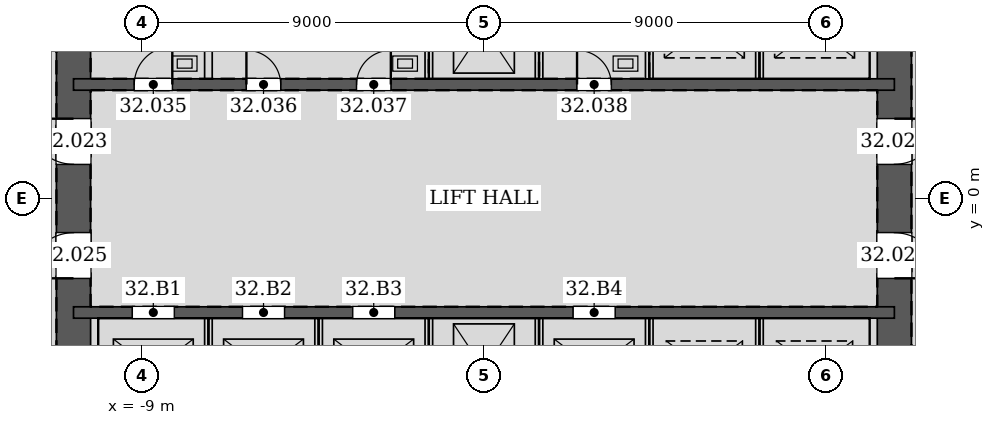
"""IFC4 building model, lengths in metres.
Left out: names, types, materials, properties, quantities, classifications, styles, units other than length and angle.
Written with IfcOpenShell. Run it as: python <this file> out.ifc"""

import sys

from ifc_helpers import new_model, si_unit, direction, frame, frame_2d, origin, place, context, subcontext, project, spatial, rectangle, extrude, element, fill, save


model = new_model("IFC4")
c1 = context("Model", 3, precision=1e-05, world=origin(), true_north=direction((0.0, 1.0)))
c2 = subcontext(c1, "Body", "Model", "MODEL_VIEW")
j1 = project(units=[si_unit("LENGTHUNIT", "METRE"), si_unit("PLANEANGLEUNIT", "RADIAN")], contexts=[c1])
p1 = place(None, origin())
s1 = spatial("IfcSite", under=j1, at=p1, CompositionType="ELEMENT")
p2 = place(p1, origin())
s2 = spatial("IfcBuilding", under=s1, at=p2, CompositionType="ELEMENT")
p3 = place(p2, frame((0.0, 0.0, 142.8)))
s3 = spatial("IfcBuildingStorey", under=s2, at=p3, CompositionType="ELEMENT", Elevation=142.8)
p4 = place(p3, frame((10.8, -10.8, 0.0), z_axis=(0.0, 0.0, 1.0), x_axis=(0.0, 1.0, 0.0)))
e1 = element("IfcWall", 1, at=p4, inside=s3, PredefinedType="SOLIDWALL", context=c2, shape_type="SweptSolid", body=[
    extrude(rectangle(XDim=21.6, YDim=0.9, at=frame_2d((10.8, 0.0))), origin(), (0.0, 0.0, 1.0), 4.2),
])
p5 = place(p4, frame((11.7, 0.0, 0.0)))
e2 = element("IfcOpeningElement", 2, at=p5, cuts=e1, PredefinedType="OPENING", context=c2, shape_type="SweptSolid", body=[
    extrude(rectangle(XDim=1.2, YDim=2.1, at=frame_2d((0.6, 1.05))), frame((0.0, 0.46, 0.0), z_axis=(0.0, -1.0, 0.0), x_axis=(1.0, 0.0, 0.0)), (0.0, 0.0, 1.0), 0.92),
])
p6 = place(p4, frame((8.7, 0.0, 0.0)))
e3 = element("IfcOpeningElement", 3, at=p6, cuts=e1, PredefinedType="OPENING", context=c2, shape_type="SweptSolid", body=[
    extrude(rectangle(XDim=1.2, YDim=2.1, at=frame_2d((0.6, 1.05))), frame((0.0, 0.46, 0.0), z_axis=(0.0, -1.0, 0.0), x_axis=(1.0, 0.0, 0.0)), (0.0, 0.0, 1.0), 0.92),
])
p7 = place(p3, frame((-10.8, 10.8, 0.0), z_axis=(0.0, 0.0, 1.0), x_axis=(0.0, -1.0, 0.0)))
e4 = element("IfcWall", 4, at=p7, inside=s3, PredefinedType="SOLIDWALL", context=c2, shape_type="SweptSolid", body=[
    extrude(rectangle(XDim=21.6, YDim=0.9, at=frame_2d((10.8, 0.0))), origin(), (0.0, 0.0, 1.0), 4.2),
])
p8 = place(p7, frame((8.7, 0.0, 0.0)))
e5 = element("IfcOpeningElement", 5, at=p8, cuts=e4, PredefinedType="OPENING", context=c2, shape_type="SweptSolid", body=[
    extrude(rectangle(XDim=1.2, YDim=2.1, at=frame_2d((0.6, 1.05))), frame((0.0, 0.46, 0.0), z_axis=(0.0, -1.0, 0.0), x_axis=(1.0, 0.0, 0.0)), (0.0, 0.0, 1.0), 0.92),
])
p9 = place(p7, frame((11.7, 0.0, 0.0)))
e6 = element("IfcOpeningElement", 6, at=p9, cuts=e4, PredefinedType="OPENING", context=c2, shape_type="SweptSolid", body=[
    extrude(rectangle(XDim=1.2, YDim=2.1, at=frame_2d((0.6, 1.05))), frame((0.0, 0.46, 0.0), z_axis=(0.0, -1.0, 0.0), x_axis=(1.0, 0.0, 0.0)), (0.0, 0.0, 1.0), 0.92),
])
p10 = place(p3, frame((-10.8, 3.0, 0.0), z_axis=(0.0, 0.0, 1.0), x_axis=(1.0, 0.0, 0.0)))
e7 = element("IfcWall", 7, at=p10, inside=s3, PredefinedType="SOLIDWALL", context=c2, shape_type="SweptSolid", body=[
    extrude(rectangle(XDim=21.6, YDim=0.3, at=frame_2d((10.8, 0.0))), origin(), (0.0, 0.0, 1.0), 4.2),
])
p11 = place(p10, frame((1.6, 0.0, 0.0)))
e8 = element("IfcOpeningElement", 8, at=p11, cuts=e7, PredefinedType="OPENING", context=c2, shape_type="SweptSolid", body=[
    extrude(rectangle(XDim=1.0, YDim=2.1, at=frame_2d((0.5, 1.05))), frame((0.0, 0.16, 0.0), z_axis=(0.0, -1.0, 0.0), x_axis=(1.0, 0.0, 0.0)), (0.0, 0.0, 1.0), 0.32),
])
p12 = place(p10, frame((4.55, 0.0, 0.0)))
e9 = element("IfcOpeningElement", 9, at=p12, cuts=e7, PredefinedType="OPENING", context=c2, shape_type="SweptSolid", body=[
    extrude(rectangle(XDim=0.9, YDim=2.1, at=frame_2d((0.45, 1.05))), frame((0.0, 0.16, 0.0), z_axis=(0.0, -1.0, 0.0), x_axis=(1.0, 0.0, 0.0)), (0.0, 0.0, 1.0), 0.32),
])
p13 = place(p10, frame((7.45, 0.0, 0.0)))
e10 = element("IfcOpeningElement", 10, at=p13, cuts=e7, PredefinedType="OPENING", context=c2, shape_type="SweptSolid", body=[
    extrude(rectangle(XDim=0.9, YDim=2.1, at=frame_2d((0.45, 1.05))), frame((0.0, 0.16, 0.0), z_axis=(0.0, -1.0, 0.0), x_axis=(1.0, 0.0, 0.0)), (0.0, 0.0, 1.0), 0.32),
])
p14 = place(p10, frame((13.25, 0.0, 0.0)))
e11 = element("IfcOpeningElement", 11, at=p14, cuts=e7, PredefinedType="OPENING", context=c2, shape_type="SweptSolid", body=[
    extrude(rectangle(XDim=0.9, YDim=2.1, at=frame_2d((0.45, 1.05))), frame((0.0, 0.16, 0.0), z_axis=(0.0, -1.0, 0.0), x_axis=(1.0, 0.0, 0.0)), (0.0, 0.0, 1.0), 0.32),
])
p15 = place(p3, frame((-10.8, -3.0, 0.0), z_axis=(0.0, 0.0, 1.0), x_axis=(1.0, 0.0, 0.0)))
e12 = element("IfcWall", 12, at=p15, inside=s3, PredefinedType="SOLIDWALL", context=c2, shape_type="SweptSolid", body=[
    extrude(rectangle(XDim=21.6, YDim=0.3, at=frame_2d((10.8, 0.0))), origin(), (0.0, 0.0, 1.0), 4.2),
])
p16 = place(p15, frame((1.55, 0.0, 0.0)))
e13 = element("IfcOpeningElement", 13, at=p16, cuts=e12, PredefinedType="OPENING", context=c2, shape_type="SweptSolid", body=[
    extrude(rectangle(XDim=1.1, YDim=2.1, at=frame_2d((0.55, 1.05))), frame((0.0, 0.16, 0.0), z_axis=(0.0, -1.0, 0.0), x_axis=(1.0, 0.0, 0.0)), (0.0, 0.0, 1.0), 0.32),
])
p17 = place(p15, frame((4.45, 0.0, 0.0)))
e14 = element("IfcOpeningElement", 14, at=p17, cuts=e12, PredefinedType="OPENING", context=c2, shape_type="SweptSolid", body=[
    extrude(rectangle(XDim=1.1, YDim=2.1, at=frame_2d((0.55, 1.05))), frame((0.0, 0.16, 0.0), z_axis=(0.0, -1.0, 0.0), x_axis=(1.0, 0.0, 0.0)), (0.0, 0.0, 1.0), 0.32),
])
p18 = place(p15, frame((7.35, 0.0, 0.0)))
e15 = element("IfcOpeningElement", 15, at=p18, cuts=e12, PredefinedType="OPENING", context=c2, shape_type="SweptSolid", body=[
    extrude(rectangle(XDim=1.1, YDim=2.1, at=frame_2d((0.55, 1.05))), frame((0.0, 0.16, 0.0), z_axis=(0.0, -1.0, 0.0), x_axis=(1.0, 0.0, 0.0)), (0.0, 0.0, 1.0), 0.32),
])
p19 = place(p15, frame((13.15, 0.0, 0.0)))
e16 = element("IfcOpeningElement", 16, at=p19, cuts=e12, PredefinedType="OPENING", context=c2, shape_type="SweptSolid", body=[
    extrude(rectangle(XDim=1.1, YDim=2.1, at=frame_2d((0.55, 1.05))), frame((0.0, 0.16, 0.0), z_axis=(0.0, -1.0, 0.0), x_axis=(1.0, 0.0, 0.0)), (0.0, 0.0, 1.0), 0.32),
])
for number, where, z_axis, x_axis in (
    (17, (-7.25, 3.15, 0.0), (0.0, 0.0, 1.0), (0.0, 1.0, 0.0)),
    (18, (-1.45, 3.15, 0.0), (0.0, 0.0, 1.0), (0.0, 1.0, 0.0)),
    (19, (1.45, 3.15, 0.0), (0.0, 0.0, 1.0), (0.0, 1.0, 0.0)),
    (20, (4.35, 3.15, 0.0), (0.0, 0.0, 1.0), (0.0, 1.0, 0.0)),
):
    element("IfcWall", number, at=place(p3, frame(where, z_axis=z_axis, x_axis=x_axis)), inside=s3, PredefinedType="PARTITIONING", context=c2, shape_type="SweptSolid", body=[
        extrude(rectangle(XDim=2.7, YDim=0.2, at=frame_2d((1.35, 0.0))), origin(), (0.0, 0.0, 1.0), 4.035),
    ])
for number, where, z_axis, x_axis in (
    (21, (7.25, 3.15, 0.0), (0.0, 0.0, 1.0), (0.0, 1.0, 0.0)),
    (22, (-7.25, -5.85, 0.0), (0.0, 0.0, 1.0), (0.0, 1.0, 0.0)),
    (23, (-4.35, -5.85, 0.0), (0.0, 0.0, 1.0), (0.0, 1.0, 0.0)),
    (24, (-1.45, -5.85, 0.0), (0.0, 0.0, 1.0), (0.0, 1.0, 0.0)),
    (25, (1.45, -5.85, 0.0), (0.0, 0.0, 1.0), (0.0, 1.0, 0.0)),
    (26, (4.35, -5.85, 0.0), (0.0, 0.0, 1.0), (0.0, 1.0, 0.0)),
    (27, (7.25, -5.85, 0.0), (0.0, 0.0, 1.0), (0.0, 1.0, 0.0)),
):
    element("IfcWall", number, at=place(p3, frame(where, z_axis=z_axis, x_axis=x_axis)), inside=s3, PredefinedType="PARTITIONING", context=c2, shape_type="SweptSolid", body=[
        extrude(rectangle(XDim=2.7, YDim=0.2, at=frame_2d((1.35, 0.0))), origin(), (0.0, 0.0, 1.0), 4.2),
    ])
p20 = place(p5, frame((1.2, 0.0, 0.0), z_axis=(0.0, 0.0, 1.0), x_axis=(-1.0, 0.0, 0.0)))
e28 = element("IfcDoor", 28, at=p20, inside=s3, OperationType="SINGLE_SWING_LEFT", PredefinedType="DOOR", context=c2, shape_type="SweptSolid", body=[
    extrude(rectangle(XDim=1.2, YDim=2.1, at=frame_2d((0.6, 1.05))), frame((0.0, 0.025, 0.0), z_axis=(0.0, -1.0, 0.0), x_axis=(1.0, 0.0, 0.0)), (0.0, 0.0, 1.0), 0.05),
])
fill(e2, e28)
p21 = place(p8, frame((1.2, 0.0, 0.0), z_axis=(0.0, 0.0, 1.0), x_axis=(-1.0, 0.0, 0.0)))
e29 = element("IfcDoor", 29, at=p21, inside=s3, OperationType="SINGLE_SWING_RIGHT", PredefinedType="DOOR", context=c2, shape_type="SweptSolid", body=[
    extrude(rectangle(XDim=1.2, YDim=2.1, at=frame_2d((0.6, 1.05))), frame((0.0, 0.025, 0.0), z_axis=(0.0, -1.0, 0.0), x_axis=(1.0, 0.0, 0.0)), (0.0, 0.0, 1.0), 0.05),
])
fill(e5, e29)
p22 = place(p6, frame((1.2, 0.0, 0.0), z_axis=(0.0, 0.0, 1.0), x_axis=(-1.0, 0.0, 0.0)))
e30 = element("IfcDoor", 30, at=p22, inside=s3, OperationType="SINGLE_SWING_RIGHT", PredefinedType="DOOR", context=c2, shape_type="SweptSolid", body=[
    extrude(rectangle(XDim=1.2, YDim=2.1, at=frame_2d((0.6, 1.05))), frame((0.0, 0.025, 0.0), z_axis=(0.0, -1.0, 0.0), x_axis=(1.0, 0.0, 0.0)), (0.0, 0.0, 1.0), 0.05),
])
fill(e3, e30)
p23 = place(p9, frame((1.2, 0.0, 0.0), z_axis=(0.0, 0.0, 1.0), x_axis=(-1.0, 0.0, 0.0)))
e31 = element("IfcDoor", 31, at=p23, inside=s3, OperationType="SINGLE_SWING_LEFT", PredefinedType="DOOR", context=c2, shape_type="SweptSolid", body=[
    extrude(rectangle(XDim=1.2, YDim=2.1, at=frame_2d((0.6, 1.05))), frame((0.0, 0.025, 0.0), z_axis=(0.0, -1.0, 0.0), x_axis=(1.0, 0.0, 0.0)), (0.0, 0.0, 1.0), 0.05),
])
fill(e6, e31)
p24 = place(p11, origin())
e32 = element("IfcDoor", 32, at=p24, inside=s3, OperationType="SINGLE_SWING_RIGHT", PredefinedType="DOOR", context=c2, shape_type="SweptSolid", body=[
    extrude(rectangle(XDim=1.0, YDim=2.1, at=frame_2d((0.5, 1.05))), frame((0.0, 0.025, 0.0), z_axis=(0.0, -1.0, 0.0), x_axis=(1.0, 0.0, 0.0)), (0.0, 0.0, 1.0), 0.05),
])
fill(e8, e32)
p25 = place(p12, origin())
e33 = element("IfcDoor", 33, at=p25, inside=s3, OperationType="SINGLE_SWING_LEFT", PredefinedType="DOOR", context=c2, shape_type="SweptSolid", body=[
    extrude(rectangle(XDim=0.9, YDim=2.1, at=frame_2d((0.45, 1.05))), frame((0.0, 0.025, 0.0), z_axis=(0.0, -1.0, 0.0), x_axis=(1.0, 0.0, 0.0)), (0.0, 0.0, 1.0), 0.05),
])
fill(e9, e33)
p26 = place(p13, origin())
e34 = element("IfcDoor", 34, at=p26, inside=s3, OperationType="SINGLE_SWING_RIGHT", PredefinedType="DOOR", context=c2, shape_type="SweptSolid", body=[
    extrude(rectangle(XDim=0.9, YDim=2.1, at=frame_2d((0.45, 1.05))), frame((0.0, 0.025, 0.0), z_axis=(0.0, -1.0, 0.0), x_axis=(1.0, 0.0, 0.0)), (0.0, 0.0, 1.0), 0.05),
])
fill(e10, e34)
p27 = place(p14, origin())
e35 = element("IfcDoor", 35, at=p27, inside=s3, OperationType="SINGLE_SWING_LEFT", PredefinedType="DOOR", context=c2, shape_type="SweptSolid", body=[
    extrude(rectangle(XDim=0.9, YDim=2.1, at=frame_2d((0.45, 1.05))), frame((0.0, 0.025, 0.0), z_axis=(0.0, -1.0, 0.0), x_axis=(1.0, 0.0, 0.0)), (0.0, 0.0, 1.0), 0.05),
])
fill(e11, e35)
p28 = place(p16, origin())
e36 = element("IfcDoor", 36, at=p28, inside=s3, OperationType="DOUBLE_DOOR_SLIDING", PredefinedType="DOOR", context=c2, shape_type="SweptSolid", body=[
    extrude(rectangle(XDim=1.1, YDim=2.1, at=frame_2d((0.55, 1.05))), frame((0.0, 0.025, 0.0), z_axis=(0.0, -1.0, 0.0), x_axis=(1.0, 0.0, 0.0)), (0.0, 0.0, 1.0), 0.05),
])
fill(e13, e36)
p29 = place(p17, origin())
e37 = element("IfcDoor", 37, at=p29, inside=s3, OperationType="DOUBLE_DOOR_SLIDING", PredefinedType="DOOR", context=c2, shape_type="SweptSolid", body=[
    extrude(rectangle(XDim=1.1, YDim=2.1, at=frame_2d((0.55, 1.05))), frame((0.0, 0.025, 0.0), z_axis=(0.0, -1.0, 0.0), x_axis=(1.0, 0.0, 0.0)), (0.0, 0.0, 1.0), 0.05),
])
fill(e14, e37)
p30 = place(p18, origin())
e38 = element("IfcDoor", 38, at=p30, inside=s3, OperationType="DOUBLE_DOOR_SLIDING", PredefinedType="DOOR", context=c2, shape_type="SweptSolid", body=[
    extrude(rectangle(XDim=1.1, YDim=2.1, at=frame_2d((0.55, 1.05))), frame((0.0, 0.025, 0.0), z_axis=(0.0, -1.0, 0.0), x_axis=(1.0, 0.0, 0.0)), (0.0, 0.0, 1.0), 0.05),
])
fill(e15, e38)
p31 = place(p19, origin())
e39 = element("IfcDoor", 39, at=p31, inside=s3, OperationType="DOUBLE_DOOR_SLIDING", PredefinedType="DOOR", context=c2, shape_type="SweptSolid", body=[
    extrude(rectangle(XDim=1.1, YDim=2.1, at=frame_2d((0.55, 1.05))), frame((0.0, 0.025, 0.0), z_axis=(0.0, -1.0, 0.0), x_axis=(1.0, 0.0, 0.0)), (0.0, 0.0, 1.0), 0.05),
])
fill(e16, e39)
save(model, sys.argv[1])
